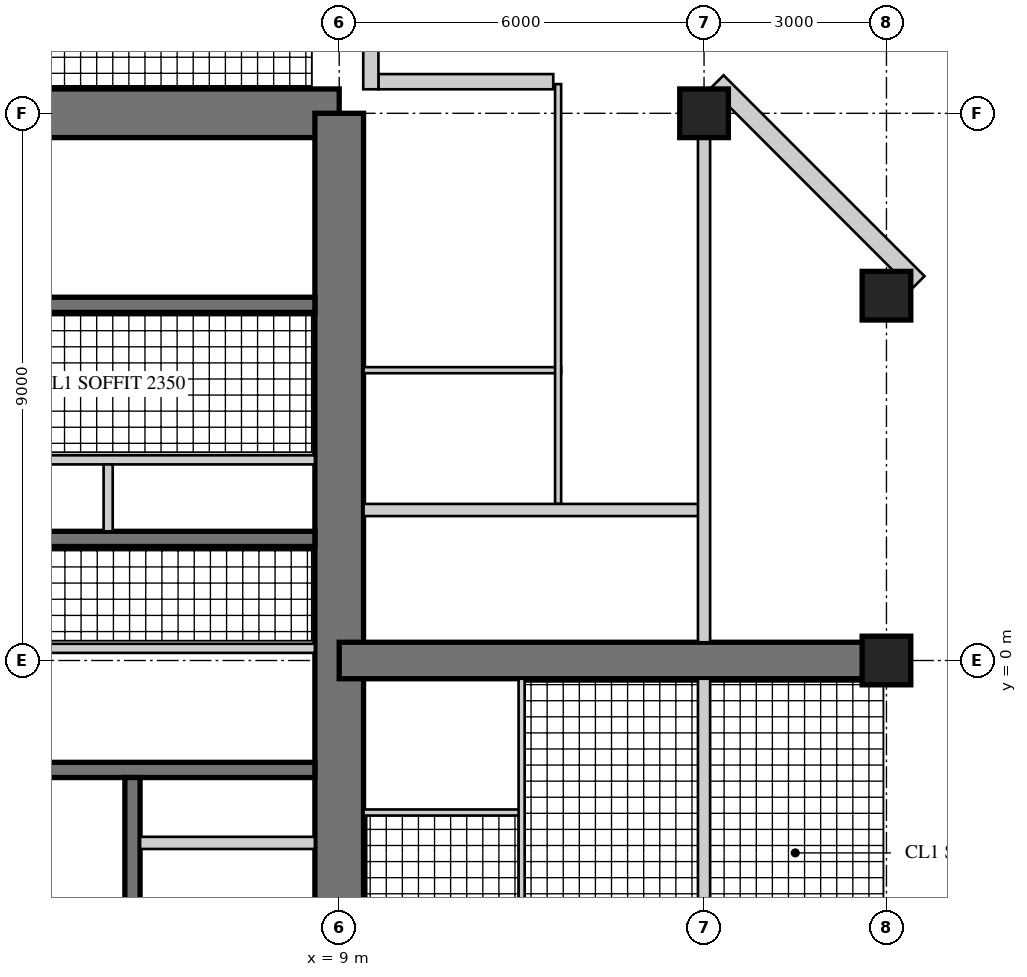
"""IFC4 building model, lengths in metres.
Left out: names, types, materials, properties, quantities, classifications, styles, units other than length and angle.
Written with IfcOpenShell. Run it as: python <this file> out.ifc"""

import sys

from ifc_helpers import new_model, si_unit, direction, frame, frame_2d, origin, origin_2d, place, context, subcontext, project, spatial, rectangle, hollow_rectangle, extrude, element, fill, save


model = new_model("IFC4")
c1 = context("Model", 3, precision=1e-05, world=origin(), true_north=direction((0.0, 1.0)))
c2 = subcontext(c1, "Body", "Model", "MODEL_VIEW")
j1 = project(units=[si_unit("LENGTHUNIT", "METRE"), si_unit("PLANEANGLEUNIT", "RADIAN")], contexts=[c1])
p1 = place(None, origin())
s1 = spatial("IfcSite", under=j1, at=p1, CompositionType="ELEMENT")
p2 = place(p1, origin())
s2 = spatial("IfcBuilding", under=s1, at=p2, CompositionType="ELEMENT")
p3 = place(p2, frame((0.0, 0.0, 242.5)))
s3 = spatial("IfcBuildingStorey", under=s2, at=p3, CompositionType="ELEMENT", Elevation=242.5)
p4 = place(p3, frame((9.0, 9.0, 0.0), z_axis=(0.0, 0.0, 1.0), x_axis=(-1.0, 0.0, 0.0)))
e1 = element("IfcWall", 1, at=p4, inside=s3, PredefinedType="SHEAR", context=c2, shape_type="SweptSolid", body=[
    extrude(rectangle(XDim=18.0, YDim=0.8, at=frame_2d((9.0, 0.0))), origin(), (0.0, 0.0, 1.0), 3.4),
])
p5 = place(p4, frame((9.8, 0.0, 0.0)))
e2 = element("IfcOpeningElement", 2, at=p5, cuts=e1, PredefinedType="OPENING", context=c2, shape_type="SweptSolid", body=[
    extrude(rectangle(XDim=1.0, YDim=2.4, at=frame_2d((0.5, 1.2))), frame((0.0, 0.41, 0.0), z_axis=(0.0, -1.0, 0.0), x_axis=(1.0, 0.0, 0.0)), (0.0, 0.0, 1.0), 0.82),
])
p6 = place(p3, frame((9.0, -9.0, 0.0), z_axis=(0.0, 0.0, 1.0), x_axis=(0.0, 1.0, 0.0)))
e3 = element("IfcWall", 3, at=p6, inside=s3, PredefinedType="SHEAR", context=c2, shape_type="SweptSolid", body=[
    extrude(rectangle(XDim=18.0, YDim=0.8, at=frame_2d((9.0, 0.0))), origin(), (0.0, 0.0, 1.0), 3.4),
])
p7 = place(p6, frame((9.8, 0.0, 0.0)))
e4 = element("IfcOpeningElement", 4, at=p7, cuts=e3, PredefinedType="OPENING", context=c2, shape_type="SweptSolid", body=[
    extrude(rectangle(XDim=1.0, YDim=2.4, at=frame_2d((0.5, 1.2))), frame((0.0, 0.41, 0.0), z_axis=(0.0, -1.0, 0.0), x_axis=(1.0, 0.0, 0.0)), (0.0, 0.0, 1.0), 0.82),
])
p8 = place(p3, frame((1.925, 2.0, 0.0), z_axis=(0.0, 0.0, 1.0), x_axis=(1.0, 0.0, 0.0)))
e5 = element("IfcWall", 5, at=p8, inside=s3, PredefinedType="SHEAR", context=c2, shape_type="SweptSolid", body=[
    extrude(rectangle(XDim=6.675, YDim=0.25, at=frame_2d((3.337, 0.0))), origin(), (0.0, 0.0, 1.0), 3.4),
])
p9 = place(p3, frame((1.925, 5.85, 0.0), z_axis=(0.0, 0.0, 1.0), x_axis=(1.0, 0.0, 0.0)))
e6 = element("IfcWall", 6, at=p9, inside=s3, PredefinedType="SHEAR", context=c2, shape_type="SweptSolid", body=[
    extrude(rectangle(XDim=6.675, YDim=0.25, at=frame_2d((3.337, 0.0))), origin(), (0.0, 0.0, 1.0), 3.4),
])
p10 = place(p9, frame((0.546, 0.0, 0.0)))
e7 = element("IfcOpeningElement", 7, at=p10, cuts=e6, PredefinedType="OPENING", context=c2, shape_type="SweptSolid", body=[
    extrude(rectangle(XDim=1.0, YDim=2.1, at=frame_2d((0.5, 1.05))), frame((0.0, 0.135, 0.0), z_axis=(0.0, -1.0, 0.0), x_axis=(1.0, 0.0, 0.0)), (0.0, 0.0, 1.0), 0.27),
])
p11 = place(p9, frame((2.837, 0.0, 0.0)))
e8 = element("IfcOpeningElement", 8, at=p11, cuts=e6, PredefinedType="OPENING", context=c2, shape_type="SweptSolid", body=[
    extrude(rectangle(XDim=1.0, YDim=2.1, at=frame_2d((0.5, 1.05))), frame((0.0, 0.135, 0.0), z_axis=(0.0, -1.0, 0.0), x_axis=(1.0, 0.0, 0.0)), (0.0, 0.0, 1.0), 0.27),
])
p12 = place(p3, frame((1.925, 3.3, 0.0), z_axis=(0.0, 0.0, 1.0), x_axis=(1.0, 0.0, 0.0)))
e9 = element("IfcWall", 9, at=p12, inside=s3, PredefinedType="PARTITIONING", context=c2, shape_type="SweptSolid", body=[
    extrude(rectangle(XDim=6.675, YDim=0.15, at=frame_2d((3.337, 0.0))), origin(), (0.0, 0.0, 1.0), 3.4),
])
p13 = place(p12, frame((0.075, 0.0, 0.0)))
e10 = element("IfcOpeningElement", 10, at=p13, cuts=e9, PredefinedType="OPENING", context=c2, shape_type="SweptSolid", body=[
    extrude(rectangle(XDim=0.8, YDim=2.1, at=frame_2d((0.4, 1.05))), frame((0.0, 0.085, 0.0), z_axis=(0.0, -1.0, 0.0), x_axis=(1.0, 0.0, 0.0)), (0.0, 0.0, 1.0), 0.17),
])
p14 = place(p12, frame((3.675, 0.0, 0.0)))
e11 = element("IfcOpeningElement", 11, at=p14, cuts=e9, PredefinedType="OPENING", context=c2, shape_type="SweptSolid", body=[
    extrude(rectangle(XDim=0.8, YDim=2.1, at=frame_2d((0.4, 1.05))), frame((0.0, 0.085, 0.0), z_axis=(0.0, -1.0, 0.0), x_axis=(1.0, 0.0, 0.0)), (0.0, 0.0, 1.0), 0.17),
])
p15 = place(p3, frame((5.2, 2.125, 0.0), z_axis=(0.0, 0.0, 1.0), x_axis=(0.0, 1.0, 0.0)))
e12 = element("IfcWall", 12, at=p15, inside=s3, PredefinedType="PARTITIONING", context=c2, shape_type="SweptSolid", body=[
    extrude(rectangle(XDim=1.1, YDim=0.15, at=frame_2d((0.55, 0.0))), origin(), (0.0, 0.0, 1.0), 3.4),
])
p16 = place(p3, frame((2.125, -1.8, 0.0), z_axis=(0.0, 0.0, 1.0), x_axis=(1.0, 0.0, 0.0)))
e13 = element("IfcWall", 13, at=p16, inside=s3, PredefinedType="SHEAR", context=c2, shape_type="SweptSolid", body=[
    extrude(rectangle(XDim=6.475, YDim=0.25, at=frame_2d((3.238, 0.0))), origin(), (0.0, 0.0, 1.0), 3.4),
])
p17 = place(p3, frame((5.6, -1.925, 0.0), z_axis=(0.0, 0.0, 1.0), x_axis=(0.0, -1.0, 0.0)))
e14 = element("IfcWall", 14, at=p17, inside=s3, PredefinedType="SHEAR", context=c2, shape_type="SweptSolid", body=[
    extrude(rectangle(XDim=3.55, YDim=0.25, at=frame_2d((1.775, 0.0))), origin(), (0.0, 0.0, 1.0), 3.4),
])
p18 = place(p17, frame((1.525, 0.0, 0.0)))
e15 = element("IfcOpeningElement", 15, at=p18, cuts=e14, PredefinedType="OPENING", context=c2, shape_type="SweptSolid", body=[
    extrude(rectangle(XDim=1.1, YDim=2.2, at=frame_2d((0.55, 1.1))), frame((0.0, 0.135, 0.0), z_axis=(0.0, -1.0, 0.0), x_axis=(1.0, 0.0, 0.0)), (0.0, 0.0, 1.0), 0.27),
])
p19 = place(p17, frame((0.075, 0.0, 0.0)))
e16 = element("IfcOpeningElement", 16, at=p19, cuts=e14, PredefinedType="OPENING", context=c2, shape_type="SweptSolid", body=[
    extrude(rectangle(XDim=0.8, YDim=2.1, at=frame_2d((0.4, 1.05))), frame((0.0, 0.135, 0.0), z_axis=(0.0, -1.0, 0.0), x_axis=(1.0, 0.0, 0.0)), (0.0, 0.0, 1.0), 0.27),
])
p20 = place(p3, frame((5.725, -3.0, 0.0), z_axis=(0.0, 0.0, 1.0), x_axis=(1.0, 0.0, 0.0)))
e17 = element("IfcWall", 17, at=p20, inside=s3, PredefinedType="PARTITIONING", context=c2, shape_type="SweptSolid", body=[
    extrude(rectangle(XDim=2.875, YDim=0.2, at=frame_2d((1.438, 0.0))), origin(), (0.0, 0.0, 1.0), 3.4),
])
p21 = place(p3, frame((9.0, 0.0, 0.0), z_axis=(0.0, 0.0, 1.0), x_axis=(1.0, 0.0, 0.0)))
e18 = element("IfcWall", 18, at=p21, inside=s3, PredefinedType="SHEAR", context=c2, shape_type="SweptSolid", body=[
    extrude(rectangle(XDim=9.0, YDim=0.6, at=frame_2d((4.5, 0.0))), origin(), (0.0, 0.0, 1.0), 3.4),
])
p22 = place(p21, frame((3.8, 0.0, 0.0)))
e19 = element("IfcOpeningElement", 19, at=p22, cuts=e18, PredefinedType="OPENING", context=c2, shape_type="SweptSolid", body=[
    extrude(rectangle(XDim=1.0, YDim=2.15, at=frame_2d((0.5, 1.075))), frame((0.0, 0.31, 0.0), z_axis=(0.0, -1.0, 0.0), x_axis=(1.0, 0.0, 0.0)), (0.0, 0.0, 1.0), 0.62),
])
p23 = place(p21, frame((7.0, 0.0, 0.0)))
e20 = element("IfcOpeningElement", 20, at=p23, cuts=e18, PredefinedType="OPENING", context=c2, shape_type="SweptSolid", body=[
    extrude(rectangle(XDim=1.0, YDim=2.2, at=frame_2d((0.5, 1.1))), frame((0.0, 0.31, 0.0), z_axis=(0.0, -1.0, 0.0), x_axis=(1.0, 0.0, 0.0)), (0.0, 0.0, 1.0), 0.62),
])
for number, where, z_axis, x_axis in (
    (21, (15.0, 9.0, 0.0), (0.0, 0.0, 1.0), (1.0, 0.0, 0.0)),
    (22, (18.0, 0.0, 0.0), (0.0, 0.0, 1.0), (1.0, 0.0, 0.0)),
    (23, (18.0, 6.0, 0.0), (0.0, 0.0, 1.0), (1.0, 0.0, 0.0)),
):
    element("IfcColumn", number, at=place(p3, frame(where, z_axis=z_axis, x_axis=x_axis)), inside=s3, PredefinedType="COLUMN", context=c2, shape_type="SweptSolid", body=[
        extrude(rectangle(XDim=0.8, YDim=0.8, at=origin_2d()), origin(), (0.0, 0.0, 1.0), 3.4),
    ])
p24 = place(p3, frame((18.52, 6.215, 0.0), z_axis=(0.0, 0.0, 1.0), x_axis=(-0.707106781187, 0.707106781187, 0.0)))
e24 = element("IfcWall", 24, at=p24, inside=s3, PredefinedType="SOLIDWALL", context=c2, shape_type="SweptSolid", body=[
    extrude(rectangle(XDim=4.674, YDim=0.3, at=frame_2d((2.337, 0.0))), origin(), (0.0, 0.0, 1.0), 3.22),
])
p25 = place(p24, frame((1.887, 0.0, 0.3)))
e25 = element("IfcOpeningElement", 25, at=p25, cuts=e24, PredefinedType="OPENING", context=c2, shape_type="SweptSolid", body=[
    extrude(rectangle(XDim=0.9, YDim=2.4, at=frame_2d((0.45, 1.2))), frame((0.0, 0.16, 0.0), z_axis=(0.0, -1.0, 0.0), x_axis=(1.0, 0.0, 0.0)), (0.0, 0.0, 1.0), 0.32),
])
p26 = place(p3, frame((12.52, 9.52, 0.0), z_axis=(0.0, 0.0, 1.0), x_axis=(-1.0, 0.0, 0.0)))
e26 = element("IfcWall", 26, at=p26, inside=s3, PredefinedType="SOLIDWALL", context=c2, shape_type="SweptSolid", body=[
    extrude(rectangle(XDim=2.875, YDim=0.25, at=frame_2d((1.438, 0.0))), origin(), (0.0, 0.0, 1.0), 3.22),
])
p27 = place(p26, frame((0.6, 0.0, 0.0)))
e27 = element("IfcOpeningElement", 27, at=p27, cuts=e26, PredefinedType="OPENING", context=c2, shape_type="SweptSolid", body=[
    extrude(rectangle(XDim=1.0, YDim=2.2, at=frame_2d((0.5, 1.1))), frame((0.0, 0.135, 0.0), z_axis=(0.0, -1.0, 0.0), x_axis=(1.0, 0.0, 0.0)), (0.0, 0.0, 1.0), 0.27),
])
p28 = place(p3, frame((9.52, 9.395, 0.0), z_axis=(0.0, 0.0, 1.0), x_axis=(0.0, 1.0, 0.0)))
e28 = element("IfcWall", 28, at=p28, inside=s3, PredefinedType="SOLIDWALL", context=c2, shape_type="SweptSolid", body=[
    extrude(rectangle(XDim=3.125, YDim=0.25, at=frame_2d((1.562, 0.0))), origin(), (0.0, 0.0, 1.0), 3.22),
])
p29 = place(p28, frame((0.6, 0.0, 0.0)))
e29 = element("IfcOpeningElement", 29, at=p29, cuts=e28, PredefinedType="OPENING", context=c2, shape_type="SweptSolid", body=[
    extrude(rectangle(XDim=1.0, YDim=2.2, at=frame_2d((0.5, 1.1))), frame((0.0, 0.135, 0.0), z_axis=(0.0, -1.0, 0.0), x_axis=(1.0, 0.0, 0.0)), (0.0, 0.0, 1.0), 0.27),
])
p30 = place(p3, frame((2.325, 0.2, 0.0), z_axis=(0.0, 0.0, 1.0), x_axis=(1.0, 0.0, 0.0)))
e30 = element("IfcWall", 30, at=p30, inside=s3, PredefinedType="PARTITIONING", context=c2, shape_type="SweptSolid", body=[
    extrude(rectangle(XDim=6.275, YDim=0.15, at=frame_2d((3.138, 0.0))), origin(), (0.0, 0.0, 1.0), 3.22),
])
p31 = place(p30, frame((0.4, 0.0, 0.0)))
e31 = element("IfcOpeningElement", 31, at=p31, cuts=e30, PredefinedType="OPENING", context=c2, shape_type="SweptSolid", body=[
    extrude(rectangle(XDim=1.0, YDim=2.1, at=frame_2d((0.5, 1.05))), frame((0.0, 0.085, 0.0), z_axis=(0.0, -1.0, 0.0), x_axis=(1.0, 0.0, 0.0)), (0.0, 0.0, 1.0), 0.17),
])
p32 = place(p3, frame((9.4, 4.775, 0.0), z_axis=(0.0, 0.0, 1.0), x_axis=(1.0, 0.0, 0.0)))
e32 = element("IfcWall", 32, at=p32, inside=s3, PredefinedType="PARTITIONING", context=c2, shape_type="SweptSolid", body=[
    extrude(rectangle(XDim=3.25, YDim=0.1, at=frame_2d((1.625, 0.0))), origin(), (0.0, 0.0, 1.0), 3.22),
])
p33 = place(p3, frame((12.6, 2.575, 0.0), z_axis=(0.0, 0.0, 1.0), x_axis=(0.0, 1.0, 0.0)))
e33 = element("IfcWall", 33, at=p33, inside=s3, PredefinedType="PARTITIONING", context=c2, shape_type="SweptSolid", body=[
    extrude(rectangle(XDim=6.905, YDim=0.1, at=frame_2d((3.453, 0.0))), origin(), (0.0, 0.0, 1.0), 3.22),
])
p34 = place(p33, frame((0.55, 0.0, 0.0)))
e34 = element("IfcOpeningElement", 34, at=p34, cuts=e33, PredefinedType="OPENING", context=c2, shape_type="SweptSolid", body=[
    extrude(rectangle(XDim=0.9, YDim=2.1, at=frame_2d((0.45, 1.05))), frame((0.0, 0.06, 0.0), z_axis=(0.0, -1.0, 0.0), x_axis=(1.0, 0.0, 0.0)), (0.0, 0.0, 1.0), 0.12),
])
p35 = place(p33, frame((2.65, 0.0, 0.0)))
e35 = element("IfcOpeningElement", 35, at=p35, cuts=e33, PredefinedType="OPENING", context=c2, shape_type="SweptSolid", body=[
    extrude(rectangle(XDim=0.9, YDim=2.1, at=frame_2d((0.45, 1.05))), frame((0.0, 0.06, 0.0), z_axis=(0.0, -1.0, 0.0), x_axis=(1.0, 0.0, 0.0)), (0.0, 0.0, 1.0), 0.12),
])
p36 = place(p3, frame((9.4, -2.5, 0.0), z_axis=(0.0, 0.0, 1.0), x_axis=(1.0, 0.0, 0.0)))
e36 = element("IfcWall", 36, at=p36, inside=s3, PredefinedType="PARTITIONING", context=c2, shape_type="SweptSolid", body=[
    extrude(rectangle(XDim=2.65, YDim=0.1, at=frame_2d((1.325, 0.0))), origin(), (0.0, 0.0, 1.0), 3.22),
])
p37 = place(p3, frame((12.0, -9.395, 0.0), z_axis=(0.0, 0.0, 1.0), x_axis=(0.0, 1.0, 0.0)))
e37 = element("IfcWall", 37, at=p37, inside=s3, PredefinedType="PARTITIONING", context=c2, shape_type="SweptSolid", body=[
    extrude(rectangle(XDim=9.095, YDim=0.1, at=frame_2d((4.547, 0.0))), origin(), (0.0, 0.0, 1.0), 3.22),
])
p38 = place(p37, frame((5.545, 0.0, 0.0)))
e38 = element("IfcOpeningElement", 38, at=p38, cuts=e37, PredefinedType="OPENING", context=c2, shape_type="SweptSolid", body=[
    extrude(rectangle(XDim=0.9, YDim=2.1, at=frame_2d((0.45, 1.05))), frame((0.0, 0.06, 0.0), z_axis=(0.0, -1.0, 0.0), x_axis=(1.0, 0.0, 0.0)), (0.0, 0.0, 1.0), 0.12),
])
p39 = place(p37, frame((7.645, 0.0, 0.0)))
e39 = element("IfcOpeningElement", 39, at=p39, cuts=e37, PredefinedType="OPENING", context=c2, shape_type="SweptSolid", body=[
    extrude(rectangle(XDim=0.9, YDim=2.1, at=frame_2d((0.45, 1.05))), frame((0.0, 0.06, 0.0), z_axis=(0.0, -1.0, 0.0), x_axis=(1.0, 0.0, 0.0)), (0.0, 0.0, 1.0), 0.12),
])
p40 = place(p3, frame((9.4, 2.475, 0.0), z_axis=(0.0, 0.0, 1.0), x_axis=(1.0, 0.0, 0.0)))
e40 = element("IfcWall", 40, at=p40, inside=s3, PredefinedType="SOLIDWALL", context=c2, shape_type="SweptSolid", body=[
    extrude(rectangle(XDim=5.6, YDim=0.2, at=frame_2d((2.8, 0.0))), origin(), (0.0, 0.0, 1.0), 3.22),
])
p41 = place(p40, frame((3.75, 0.0, 0.0)))
e41 = element("IfcOpeningElement", 41, at=p41, cuts=e40, PredefinedType="OPENING", context=c2, shape_type="SweptSolid", body=[
    extrude(rectangle(XDim=1.0, YDim=2.15, at=frame_2d((0.5, 1.075))), frame((0.0, 0.11, 0.0), z_axis=(0.0, -1.0, 0.0), x_axis=(1.0, 0.0, 0.0)), (0.0, 0.0, 1.0), 0.22),
])
p42 = place(p3, frame((15.0, -8.6, 0.0), z_axis=(0.0, 0.0, 1.0), x_axis=(0.0, 1.0, 0.0)))
e42 = element("IfcWall", 42, at=p42, inside=s3, PredefinedType="SOLIDWALL", context=c2, shape_type="SweptSolid", body=[
    extrude(rectangle(XDim=8.3, YDim=0.2, at=frame_2d((4.15, 0.0))), origin(), (0.0, 0.0, 1.0), 2.52),
])
p43 = place(p3, frame((15.0, 0.3, 0.0), z_axis=(0.0, 0.0, 1.0), x_axis=(0.0, 1.0, 0.0)))
e43 = element("IfcWall", 43, at=p43, inside=s3, PredefinedType="SOLIDWALL", context=c2, shape_type="SweptSolid", body=[
    extrude(rectangle(XDim=8.3, YDim=0.2, at=frame_2d((4.15, 0.0))), origin(), (0.0, 0.0, 1.0), 2.52),
])
p44 = place(p43, frame((0.45, 0.0, 0.0)))
e44 = element("IfcOpeningElement", 44, at=p44, cuts=e43, PredefinedType="OPENING", context=c2, shape_type="SweptSolid", body=[
    extrude(rectangle(XDim=1.0, YDim=2.2, at=frame_2d((0.5, 1.1))), frame((0.0, 0.11, 0.0), z_axis=(0.0, -1.0, 0.0), x_axis=(1.0, 0.0, 0.0)), (0.0, 0.0, 1.0), 0.22),
])
p45 = place(p25, origin())
e45 = element("IfcWindow", 45, at=p45, inside=s3, PartitioningType="SINGLE_PANEL", PredefinedType="WINDOW", context=c2, shape_type="SweptSolid", body=[
    extrude(hollow_rectangle(XDim=0.9, YDim=2.4, WallThickness=0.06, at=frame_2d((0.45, 1.2))), frame((0.0, 0.03, 0.0), z_axis=(0.0, -1.0, 0.0), x_axis=(1.0, 0.0, 0.0)), (0.0, 0.0, 1.0), 0.06),
    extrude(rectangle(XDim=0.779, YDim=2.279, at=frame_2d((0.45, 1.2))), frame((0.0, 0.03, 0.0), z_axis=(0.0, -1.0, 0.0), x_axis=(1.0, 0.0, 0.0)), (0.0, 0.0, 1.0), 0.06),
])
fill(e25, e45)
p46 = place(p27, origin())
e46 = element("IfcDoor", 46, at=p46, inside=s3, OperationType="SINGLE_SWING_LEFT", PredefinedType="DOOR", context=c2, shape_type="SweptSolid", body=[
    extrude(hollow_rectangle(XDim=1.0, YDim=2.2, WallThickness=0.06, at=frame_2d((0.5, 1.1))), frame((0.0, 0.025, 0.0), z_axis=(0.0, -1.0, 0.0), x_axis=(1.0, 0.0, 0.0)), (0.0, 0.0, 1.0), 0.05),
    extrude(rectangle(XDim=0.879, YDim=2.079, at=frame_2d((0.5, 1.1))), frame((0.0, 0.025, 0.0), z_axis=(0.0, -1.0, 0.0), x_axis=(1.0, 0.0, 0.0)), (0.0, 0.0, 1.0), 0.05),
])
fill(e27, e46)
p47 = place(p29, origin())
e47 = element("IfcDoor", 47, at=p47, inside=s3, OperationType="SINGLE_SWING_RIGHT", PredefinedType="DOOR", context=c2, shape_type="SweptSolid", body=[
    extrude(hollow_rectangle(XDim=1.0, YDim=2.2, WallThickness=0.06, at=frame_2d((0.5, 1.1))), frame((0.0, 0.025, 0.0), z_axis=(0.0, -1.0, 0.0), x_axis=(1.0, 0.0, 0.0)), (0.0, 0.0, 1.0), 0.05),
    extrude(rectangle(XDim=0.879, YDim=2.079, at=frame_2d((0.5, 1.1))), frame((0.0, 0.025, 0.0), z_axis=(0.0, -1.0, 0.0), x_axis=(1.0, 0.0, 0.0)), (0.0, 0.0, 1.0), 0.05),
])
fill(e29, e47)
p48 = place(p34, origin())
e48 = element("IfcDoor", 48, at=p48, inside=s3, OperationType="SINGLE_SWING_LEFT", PredefinedType="DOOR", context=c2, shape_type="SweptSolid", body=[
    extrude(rectangle(XDim=0.9, YDim=2.1, at=frame_2d((0.45, 1.05))), frame((0.0, 0.025, 0.0), z_axis=(0.0, -1.0, 0.0), x_axis=(1.0, 0.0, 0.0)), (0.0, 0.0, 1.0), 0.05),
])
fill(e34, e48)
p49 = place(p35, origin())
e49 = element("IfcDoor", 49, at=p49, inside=s3, OperationType="SINGLE_SWING_LEFT", PredefinedType="DOOR", context=c2, shape_type="SweptSolid", body=[
    extrude(rectangle(XDim=0.9, YDim=2.1, at=frame_2d((0.45, 1.05))), frame((0.0, 0.025, 0.0), z_axis=(0.0, -1.0, 0.0), x_axis=(1.0, 0.0, 0.0)), (0.0, 0.0, 1.0), 0.05),
])
fill(e35, e49)
p50 = place(p38, origin())
e50 = element("IfcDoor", 50, at=p50, inside=s3, OperationType="SINGLE_SWING_RIGHT", PredefinedType="DOOR", context=c2, shape_type="SweptSolid", body=[
    extrude(rectangle(XDim=0.9, YDim=2.1, at=frame_2d((0.45, 1.05))), frame((0.0, 0.025, 0.0), z_axis=(0.0, -1.0, 0.0), x_axis=(1.0, 0.0, 0.0)), (0.0, 0.0, 1.0), 0.05),
])
fill(e38, e50)
p51 = place(p39, origin())
e51 = element("IfcDoor", 51, at=p51, inside=s3, OperationType="SINGLE_SWING_RIGHT", PredefinedType="DOOR", context=c2, shape_type="SweptSolid", body=[
    extrude(rectangle(XDim=0.9, YDim=2.1, at=frame_2d((0.45, 1.05))), frame((0.0, 0.025, 0.0), z_axis=(0.0, -1.0, 0.0), x_axis=(1.0, 0.0, 0.0)), (0.0, 0.0, 1.0), 0.05),
])
fill(e39, e51)
p52 = place(p41, origin())
e52 = element("IfcDoor", 52, at=p52, inside=s3, OperationType="SINGLE_SWING_LEFT", PredefinedType="DOOR", context=c2, shape_type="SweptSolid", body=[
    extrude(rectangle(XDim=1.0, YDim=2.15, at=frame_2d((0.5, 1.075))), frame((0.0, 0.025, 0.0), z_axis=(0.0, -1.0, 0.0), x_axis=(1.0, 0.0, 0.0)), (0.0, 0.0, 1.0), 0.05),
])
fill(e41, e52)
p53 = place(p44, frame((1.0, 0.0, 0.0), z_axis=(0.0, 0.0, 1.0), x_axis=(-1.0, 0.0, 0.0)))
e53 = element("IfcDoor", 53, at=p53, inside=s3, OperationType="SINGLE_SWING_LEFT", PredefinedType="DOOR", context=c2, shape_type="SweptSolid", body=[
    extrude(rectangle(XDim=1.0, YDim=2.2, at=frame_2d((0.5, 1.1))), frame((0.0, 0.025, 0.0), z_axis=(0.0, -1.0, 0.0), x_axis=(1.0, 0.0, 0.0)), (0.0, 0.0, 1.0), 0.05),
])
fill(e44, e53)
p54 = place(p22, frame((1.0, 0.0, 0.0), z_axis=(0.0, 0.0, 1.0), x_axis=(-1.0, 0.0, 0.0)))
e54 = element("IfcDoor", 54, at=p54, inside=s3, OperationType="SINGLE_SWING_RIGHT", PredefinedType="DOOR", context=c2, shape_type="SweptSolid", body=[
    extrude(rectangle(XDim=1.0, YDim=2.15, at=frame_2d((0.5, 1.075))), frame((0.0, 0.025, 0.0), z_axis=(0.0, -1.0, 0.0), x_axis=(1.0, 0.0, 0.0)), (0.0, 0.0, 1.0), 0.05),
])
fill(e19, e54)
p55 = place(p23, origin())
e55 = element("IfcDoor", 55, at=p55, inside=s3, OperationType="SINGLE_SWING_LEFT", PredefinedType="DOOR", context=c2, shape_type="SweptSolid", body=[
    extrude(rectangle(XDim=1.0, YDim=2.2, at=frame_2d((0.5, 1.1))), frame((0.0, 0.025, 0.0), z_axis=(0.0, -1.0, 0.0), x_axis=(1.0, 0.0, 0.0)), (0.0, 0.0, 1.0), 0.05),
])
fill(e20, e55)
p56 = place(p7, origin())
e56 = element("IfcDoor", 56, at=p56, inside=s3, OperationType="SINGLE_SWING_RIGHT", PredefinedType="DOOR", context=c2, shape_type="SweptSolid", body=[
    extrude(rectangle(XDim=1.0, YDim=2.4, at=frame_2d((0.5, 1.2))), frame((0.0, 0.055, 0.0), z_axis=(0.0, -1.0, 0.0), x_axis=(1.0, 0.0, 0.0)), (0.0, 0.0, 1.0), 0.05),
])
fill(e4, e56)
p57 = place(p14, frame((0.8, 0.0, 0.0), z_axis=(0.0, 0.0, 1.0), x_axis=(-1.0, 0.0, 0.0)))
e57 = element("IfcDoor", 57, at=p57, inside=s3, OperationType="SINGLE_SWING_RIGHT", PredefinedType="DOOR", context=c2, shape_type="SweptSolid", body=[
    extrude(rectangle(XDim=0.8, YDim=2.1, at=frame_2d((0.4, 1.05))), frame((0.0, 0.025, 0.0), z_axis=(0.0, -1.0, 0.0), x_axis=(1.0, 0.0, 0.0)), (0.0, 0.0, 1.0), 0.05),
])
fill(e11, e57)
p58 = place(p18, origin())
e58 = element("IfcDoor", 58, at=p58, inside=s3, OperationType="DOUBLE_DOOR_SLIDING", PredefinedType="DOOR", context=c2, shape_type="SweptSolid", body=[
    extrude(rectangle(XDim=1.1, YDim=2.2, at=frame_2d((0.55, 1.1))), frame((0.0, 0.025, 0.0), z_axis=(0.0, -1.0, 0.0), x_axis=(1.0, 0.0, 0.0)), (0.0, 0.0, 1.0), 0.05),
])
fill(e15, e58)
p59 = place(p19, origin())
e59 = element("IfcDoor", 59, at=p59, inside=s3, OperationType="SINGLE_SWING_LEFT", PredefinedType="DOOR", context=c2, shape_type="SweptSolid", body=[
    extrude(rectangle(XDim=0.8, YDim=2.1, at=frame_2d((0.4, 1.05))), frame((0.0, 0.025, 0.0), z_axis=(0.0, -1.0, 0.0), x_axis=(1.0, 0.0, 0.0)), (0.0, 0.0, 1.0), 0.05),
])
fill(e16, e59)
p60 = place(p11, origin())
e60 = element("IfcDoor", 60, at=p60, inside=s3, OperationType="SINGLE_SWING_LEFT", PredefinedType="DOOR", context=c2, shape_type="SweptSolid", body=[
    extrude(rectangle(XDim=1.0, YDim=2.1, at=frame_2d((0.5, 1.05))), frame((0.0, 0.025, 0.0), z_axis=(0.0, -1.0, 0.0), x_axis=(1.0, 0.0, 0.0)), (0.0, 0.0, 1.0), 0.05),
])
fill(e8, e60)
save(model, sys.argv[1])
